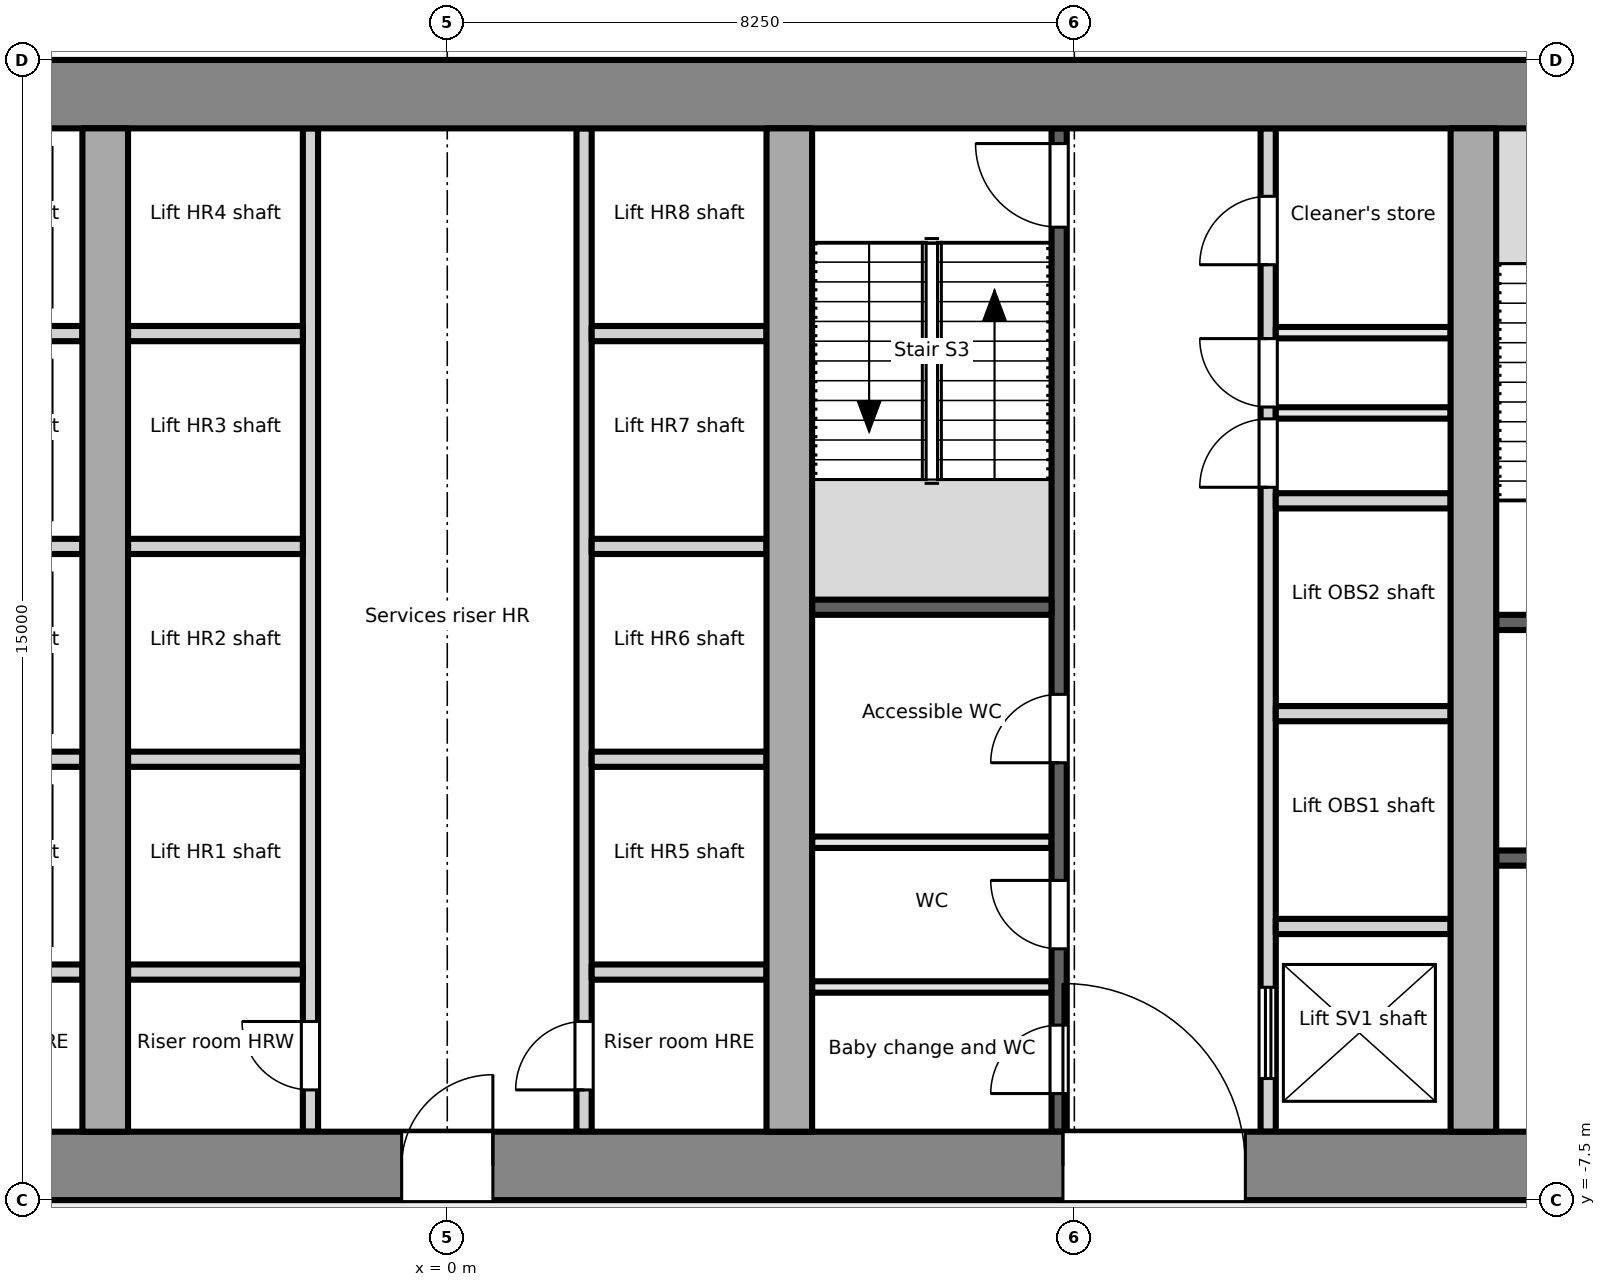
"""IFC4 building model, lengths in metres.
Left out: names, types, materials, properties, quantities, classifications, styles, units other than length and angle.
Written with IfcOpenShell. Run it as: python <this file> out.ifc"""

import sys

from ifc_helpers import new_model, si_unit, direction, frame, frame_2d, origin, place, context, subcontext, project, spatial, rectangle, extrude, element, fill, save


model = new_model("IFC4")
c1 = context("Model", 3, precision=1e-05, world=origin(), true_north=direction((0.0, 1.0)))
c2 = subcontext(c1, "Body", "Model", "MODEL_VIEW")
j1 = project(units=[si_unit("LENGTHUNIT", "METRE"), si_unit("PLANEANGLEUNIT", "RADIAN")], contexts=[c1])
p1 = place(None, origin())
s1 = spatial("IfcSite", under=j1, at=p1, CompositionType="ELEMENT")
p2 = place(p1, origin())
s2 = spatial("IfcBuilding", under=s1, at=p2, CompositionType="ELEMENT")
p3 = place(p2, frame((0.0, 0.0, 17.4)))
s3 = spatial("IfcBuildingStorey", under=s2, at=p3, CompositionType="ELEMENT", Elevation=17.4)
p4 = place(p3, frame((-18.0, -7.05, -0.2), z_axis=(0.0, 0.0, 1.0), x_axis=(1.0, 0.0, 0.0)))
e1 = element("IfcWall", 1, at=p4, inside=s3, PredefinedType="SHEAR", context=c2, shape_type="SweptSolid", body=[
    extrude(rectangle(XDim=36.0, YDim=0.9, at=frame_2d((18.0, 0.0))), origin(), (0.0, 0.0, 1.0), 4.8),
])
p5 = place(p4, frame((7.8, 0.0, 0.2)))
e2 = element("IfcOpeningElement", 2, at=p5, cuts=e1, PredefinedType="OPENING", context=c2, shape_type="SweptSolid", body=[
    extrude(rectangle(XDim=2.4, YDim=2.1, at=frame_2d((1.2, 1.05))), frame((0.0, 0.46, 0.0), z_axis=(0.0, -1.0, 0.0), x_axis=(1.0, 0.0, 0.0)), (0.0, 0.0, 1.0), 0.921),
])
p6 = place(p4, frame((17.4, 0.0, 0.2)))
e3 = element("IfcOpeningElement", 3, at=p6, cuts=e1, PredefinedType="OPENING", context=c2, shape_type="SweptSolid", body=[
    extrude(rectangle(XDim=1.2, YDim=2.1, at=frame_2d((0.6, 1.05))), frame((0.0, 0.46, 0.0), z_axis=(0.0, -1.0, 0.0), x_axis=(1.0, 0.0, 0.0)), (0.0, 0.0, 1.0), 0.921),
])
p7 = place(p4, frame((26.1, 0.0, 0.2)))
e4 = element("IfcOpeningElement", 4, at=p7, cuts=e1, PredefinedType="OPENING", context=c2, shape_type="SweptSolid", body=[
    extrude(rectangle(XDim=2.4, YDim=2.1, at=frame_2d((1.2, 1.05))), frame((0.0, 0.46, 0.0), z_axis=(0.0, -1.0, 0.0), x_axis=(1.0, 0.0, 0.0)), (0.0, 0.0, 1.0), 0.921),
])
p8 = place(p3, frame((-18.0, 7.05, -0.2), z_axis=(0.0, 0.0, 1.0), x_axis=(1.0, 0.0, 0.0)))
e5 = element("IfcWall", 5, at=p8, inside=s3, PredefinedType="SHEAR", context=c2, shape_type="SweptSolid", body=[
    extrude(rectangle(XDim=36.0, YDim=0.9, at=frame_2d((18.0, 0.0))), origin(), (0.0, 0.0, 1.0), 4.8),
])
for number, where, z_axis, x_axis in (
    (6, (-4.5, -6.6, -0.2), (0.0, 0.0, 1.0), (0.0, 1.0, 0.0)),
    (7, (4.5, -6.6, -0.2), (0.0, 0.0, 1.0), (0.0, 1.0, 0.0)),
    (8, (13.5, -6.6, -0.2), (0.0, 0.0, 1.0), (0.0, 1.0, 0.0)),
):
    element("IfcWall", number, at=place(p3, frame(where, z_axis=z_axis, x_axis=x_axis)), inside=s3, PredefinedType="SHEAR", context=c2, shape_type="SweptSolid", body=[
        extrude(rectangle(XDim=13.2, YDim=0.6, at=frame_2d((6.6, 0.0))), origin(), (0.0, 0.0, 1.0), 4.8),
    ])
p9 = place(p3, frame((13.8, -3.0, 0.0), z_axis=(0.0, 0.0, 1.0), x_axis=(1.0, 0.0, 0.0)))
e9 = element("IfcWall", 9, at=p9, inside=s3, PredefinedType="PARTITIONING", context=c2, shape_type="SweptSolid", body=[
    extrude(rectangle(XDim=3.3, YDim=0.2, at=frame_2d((1.65, 0.0))), origin(), (0.0, 0.0, 1.0), 4.6),
])
p10 = place(p9, frame((1.1, 0.0, 0.0)))
e10 = element("IfcOpeningElement", 10, at=p10, cuts=e9, PredefinedType="OPENING", context=c2, shape_type="SweptSolid", body=[
    extrude(rectangle(XDim=1.1, YDim=2.1, at=frame_2d((0.55, 1.05))), frame((0.0, 0.111, 0.0), z_axis=(0.0, -1.0, 0.0), x_axis=(1.0, 0.0, 0.0)), (0.0, 0.0, 1.0), 0.221),
])
p11 = place(p3, frame((13.8, 0.1, 0.0), z_axis=(0.0, 0.0, 1.0), x_axis=(1.0, 0.0, 0.0)))
e11 = element("IfcWall", 11, at=p11, inside=s3, PredefinedType="PARTITIONING", context=c2, shape_type="SweptSolid", body=[
    extrude(rectangle(XDim=3.3, YDim=0.2, at=frame_2d((1.65, 0.0))), origin(), (0.0, 0.0, 1.0), 4.6),
])
p12 = place(p11, frame((1.1, 0.0, 0.0)))
e12 = element("IfcOpeningElement", 12, at=p12, cuts=e11, PredefinedType="OPENING", context=c2, shape_type="SweptSolid", body=[
    extrude(rectangle(XDim=1.1, YDim=2.1, at=frame_2d((0.55, 1.05))), frame((0.0, 0.111, 0.0), z_axis=(0.0, -1.0, 0.0), x_axis=(1.0, 0.0, 0.0)), (0.0, 0.0, 1.0), 0.221),
])
for number, where, z_axis, x_axis in (
    (13, (-7.1, -1.7, 0.0), (0.0, 0.0, 1.0), (1.0, 0.0, 0.0)),
    (14, (-7.1, 1.1, 0.0), (0.0, 0.0, 1.0), (1.0, 0.0, 0.0)),
    (15, (-7.1, 3.9, 0.0), (0.0, 0.0, 1.0), (1.0, 0.0, 0.0)),
    (16, (-7.1, -4.5, 0.0), (0.0, 0.0, 1.0), (1.0, 0.0, 0.0)),
):
    element("IfcWall", number, at=place(p3, frame(where, z_axis=z_axis, x_axis=x_axis)), inside=s3, PredefinedType="PARTITIONING", context=c2, shape_type="SweptSolid", body=[
        extrude(rectangle(XDim=2.3, YDim=0.2, at=frame_2d((1.15, 0.0))), origin(), (0.0, 0.0, 1.0), 4.6),
    ])
p13 = place(p3, frame((-1.8, -6.6, 0.0), z_axis=(0.0, 0.0, 1.0), x_axis=(0.0, 1.0, 0.0)))
e17 = element("IfcWall", 17, at=p13, inside=s3, PredefinedType="PARTITIONING", context=c2, shape_type="SweptSolid", body=[
    extrude(rectangle(XDim=13.2, YDim=0.2, at=frame_2d((6.6, 0.0))), origin(), (0.0, 0.0, 1.0), 4.6),
])
p14 = place(p13, frame((0.55, 0.0, 0.0)))
e18 = element("IfcOpeningElement", 18, at=p14, cuts=e17, PredefinedType="OPENING", context=c2, shape_type="SweptSolid", body=[
    extrude(rectangle(XDim=0.9, YDim=2.1, at=frame_2d((0.45, 1.05))), frame((0.0, 0.111, 0.0), z_axis=(0.0, -1.0, 0.0), x_axis=(1.0, 0.0, 0.0)), (0.0, 0.0, 1.0), 0.221),
])
p15 = place(p3, frame((1.8, -6.6, 0.0), z_axis=(0.0, 0.0, 1.0), x_axis=(0.0, 1.0, 0.0)))
e19 = element("IfcWall", 19, at=p15, inside=s3, PredefinedType="PARTITIONING", context=c2, shape_type="SweptSolid", body=[
    extrude(rectangle(XDim=13.2, YDim=0.2, at=frame_2d((6.6, 0.0))), origin(), (0.0, 0.0, 1.0), 4.6),
])
p16 = place(p15, frame((0.55, 0.0, 0.0)))
e20 = element("IfcOpeningElement", 20, at=p16, cuts=e19, PredefinedType="OPENING", context=c2, shape_type="SweptSolid", body=[
    extrude(rectangle(XDim=0.9, YDim=2.1, at=frame_2d((0.45, 1.05))), frame((0.0, 0.111, 0.0), z_axis=(0.0, -1.0, 0.0), x_axis=(1.0, 0.0, 0.0)), (0.0, 0.0, 1.0), 0.221),
])
for number, where, z_axis, x_axis in (
    (21, (-4.2, -1.7, 0.0), (0.0, 0.0, 1.0), (1.0, 0.0, 0.0)),
    (22, (-4.2, 1.1, 0.0), (0.0, 0.0, 1.0), (1.0, 0.0, 0.0)),
    (23, (-4.2, 3.9, 0.0), (0.0, 0.0, 1.0), (1.0, 0.0, 0.0)),
    (24, (-4.2, -4.5, 0.0), (0.0, 0.0, 1.0), (1.0, 0.0, 0.0)),
    (25, (1.9, -1.7, 0.0), (0.0, 0.0, 1.0), (1.0, 0.0, 0.0)),
    (26, (1.9, 1.1, 0.0), (0.0, 0.0, 1.0), (1.0, 0.0, 0.0)),
    (27, (1.9, 3.9, 0.0), (0.0, 0.0, 1.0), (1.0, 0.0, 0.0)),
    (28, (1.9, -4.5, 0.0), (0.0, 0.0, 1.0), (1.0, 0.0, 0.0)),
):
    element("IfcWall", number, at=place(p3, frame(where, z_axis=z_axis, x_axis=x_axis)), inside=s3, PredefinedType="PARTITIONING", context=c2, shape_type="SweptSolid", body=[
        extrude(rectangle(XDim=2.3, YDim=0.2, at=frame_2d((1.15, 0.0))), origin(), (0.0, 0.0, 1.0), 4.6),
    ])
p17 = place(p3, frame((8.05, -6.6, 0.0), z_axis=(0.0, 0.0, 1.0), x_axis=(0.0, 1.0, 0.0)))
e29 = element("IfcWall", 29, at=p17, inside=s3, PredefinedType="PARTITIONING", context=c2, shape_type="SweptSolid", body=[
    extrude(rectangle(XDim=13.2, YDim=0.2, at=frame_2d((6.6, 0.0))), origin(), (0.0, 0.0, 1.0), 4.6),
])
p18 = place(p17, frame((0.502, 0.0, 0.0)))
e30 = element("IfcOpeningElement", 30, at=p18, cuts=e29, PredefinedType="OPENING", context=c2, shape_type="SweptSolid", body=[
    extrude(rectangle(XDim=0.9, YDim=2.1, at=frame_2d((0.45, 1.05))), frame((0.0, 0.111, 0.0), z_axis=(0.0, -1.0, 0.0), x_axis=(1.0, 0.0, 0.0)), (0.0, 0.0, 1.0), 0.221),
])
p19 = place(p17, frame((2.406, 0.0, 0.0)))
e31 = element("IfcOpeningElement", 31, at=p19, cuts=e29, PredefinedType="OPENING", context=c2, shape_type="SweptSolid", body=[
    extrude(rectangle(XDim=0.9, YDim=2.1, at=frame_2d((0.45, 1.05))), frame((0.0, 0.111, 0.0), z_axis=(0.0, -1.0, 0.0), x_axis=(1.0, 0.0, 0.0)), (0.0, 0.0, 1.0), 0.221),
])
p20 = place(p17, frame((4.854, 0.0, 0.0)))
e32 = element("IfcOpeningElement", 32, at=p20, cuts=e29, PredefinedType="OPENING", context=c2, shape_type="SweptSolid", body=[
    extrude(rectangle(XDim=0.9, YDim=2.1, at=frame_2d((0.45, 1.05))), frame((0.0, 0.111, 0.0), z_axis=(0.0, -1.0, 0.0), x_axis=(1.0, 0.0, 0.0)), (0.0, 0.0, 1.0), 0.221),
])
p21 = place(p17, frame((11.9, 0.0, 0.0)))
e33 = element("IfcOpeningElement", 33, at=p21, cuts=e29, PredefinedType="OPENING", context=c2, shape_type="SweptSolid", body=[
    extrude(rectangle(XDim=1.1, YDim=2.1, at=frame_2d((0.55, 1.05))), frame((0.0, 0.111, 0.0), z_axis=(0.0, -1.0, 0.0), x_axis=(1.0, 0.0, 0.0)), (0.0, 0.0, 1.0), 0.221),
])
p22 = place(p3, frame((10.8, -6.6, 0.0), z_axis=(0.0, 0.0, 1.0), x_axis=(0.0, 1.0, 0.0)))
e34 = element("IfcWall", 34, at=p22, inside=s3, PredefinedType="PARTITIONING", context=c2, shape_type="SweptSolid", body=[
    extrude(rectangle(XDim=13.2, YDim=0.2, at=frame_2d((6.6, 0.0))), origin(), (0.0, 0.0, 1.0), 4.6),
])
p23 = place(p22, frame((0.7, 0.0, 0.0)))
e35 = element("IfcOpeningElement", 35, at=p23, cuts=e34, PredefinedType="OPENING", context=c2, shape_type="SweptSolid", body=[
    extrude(rectangle(XDim=1.2, YDim=2.1, at=frame_2d((0.6, 1.05))), frame((0.0, 0.111, 0.0), z_axis=(0.0, -1.0, 0.0), x_axis=(1.0, 0.0, 0.0)), (0.0, 0.0, 1.0), 0.221),
])
p24 = place(p22, frame((8.478, 0.0, 0.0)))
e36 = element("IfcOpeningElement", 36, at=p24, cuts=e34, PredefinedType="OPENING", context=c2, shape_type="SweptSolid", body=[
    extrude(rectangle(XDim=0.9, YDim=2.1, at=frame_2d((0.45, 1.05))), frame((0.0, 0.111, 0.0), z_axis=(0.0, -1.0, 0.0), x_axis=(1.0, 0.0, 0.0)), (0.0, 0.0, 1.0), 0.221),
])
p25 = place(p22, frame((9.534, 0.0, 0.0)))
e37 = element("IfcOpeningElement", 37, at=p25, cuts=e34, PredefinedType="OPENING", context=c2, shape_type="SweptSolid", body=[
    extrude(rectangle(XDim=0.9, YDim=2.1, at=frame_2d((0.45, 1.05))), frame((0.0, 0.111, 0.0), z_axis=(0.0, -1.0, 0.0), x_axis=(1.0, 0.0, 0.0)), (0.0, 0.0, 1.0), 0.221),
])
p26 = place(p22, frame((11.406, 0.0, 0.0)))
e38 = element("IfcOpeningElement", 38, at=p26, cuts=e34, PredefinedType="OPENING", context=c2, shape_type="SweptSolid", body=[
    extrude(rectangle(XDim=0.9, YDim=2.1, at=frame_2d((0.45, 1.05))), frame((0.0, 0.111, 0.0), z_axis=(0.0, -1.0, 0.0), x_axis=(1.0, 0.0, 0.0)), (0.0, 0.0, 1.0), 0.221),
])
p27 = place(p3, frame((4.8, 0.3, 0.0), z_axis=(0.0, 0.0, 1.0), x_axis=(1.0, 0.0, 0.0)))
e39 = element("IfcWall", 39, at=p27, inside=s3, PredefinedType="PARTITIONING", context=c2, shape_type="SweptSolid", body=[
    extrude(rectangle(XDim=3.15, YDim=0.2, at=frame_2d((1.575, 0.0))), origin(), (0.0, 0.0, 1.0), 4.6),
])
for number, where, z_axis, x_axis in (
    (40, (4.8, -4.696, 0.0), (0.0, 0.0, 1.0), (1.0, 0.0, 0.0)),
    (41, (4.8, -2.792, 0.0), (0.0, 0.0, 1.0), (1.0, 0.0, 0.0)),
):
    element("IfcWall", number, at=place(p3, frame(where, z_axis=z_axis, x_axis=x_axis)), inside=s3, PredefinedType="PARTITIONING", context=c2, shape_type="SweptSolid", body=[
        extrude(rectangle(XDim=3.15, YDim=0.15, at=frame_2d((1.575, 0.0))), origin(), (0.0, 0.0, 1.0), 4.6),
    ])
for number, where, z_axis, x_axis in (
    (42, (10.9, -3.9, 0.0), (0.0, 0.0, 1.0), (1.0, 0.0, 0.0)),
    (43, (10.9, -1.1, 0.0), (0.0, 0.0, 1.0), (1.0, 0.0, 0.0)),
    (44, (10.9, 1.7, 0.0), (0.0, 0.0, 1.0), (1.0, 0.0, 0.0)),
):
    element("IfcWall", number, at=place(p3, frame(where, z_axis=z_axis, x_axis=x_axis)), inside=s3, PredefinedType="PARTITIONING", context=c2, shape_type="SweptSolid", body=[
        extrude(rectangle(XDim=2.3, YDim=0.2, at=frame_2d((1.15, 0.0))), origin(), (0.0, 0.0, 1.0), 4.6),
    ])
for number, where, z_axis, x_axis in (
    (45, (10.9, 2.856, 0.0), (0.0, 0.0, 1.0), (1.0, 0.0, 0.0)),
    (46, (10.9, 3.912, 0.0), (0.0, 0.0, 1.0), (1.0, 0.0, 0.0)),
):
    element("IfcWall", number, at=place(p3, frame(where, z_axis=z_axis, x_axis=x_axis)), inside=s3, PredefinedType="PARTITIONING", context=c2, shape_type="SweptSolid", body=[
        extrude(rectangle(XDim=2.3, YDim=0.15, at=frame_2d((1.15, 0.0))), origin(), (0.0, 0.0, 1.0), 4.6),
    ])
p28 = place(p14, origin())
e47 = element("IfcDoor", 47, at=p28, inside=s3, OperationType="SINGLE_SWING_RIGHT", PredefinedType="DOOR", context=c2, shape_type="SweptSolid", body=[
    extrude(rectangle(XDim=0.9, YDim=2.1, at=frame_2d((0.45, 1.05))), frame((0.0, 0.025, 0.0), z_axis=(0.0, -1.0, 0.0), x_axis=(1.0, 0.0, 0.0)), (0.0, 0.0, 1.0), 0.05),
])
fill(e18, e47)
p29 = place(p16, origin())
e48 = element("IfcDoor", 48, at=p29, inside=s3, OperationType="SINGLE_SWING_LEFT", PredefinedType="DOOR", context=c2, shape_type="SweptSolid", body=[
    extrude(rectangle(XDim=0.9, YDim=2.1, at=frame_2d((0.45, 1.05))), frame((0.0, 0.025, 0.0), z_axis=(0.0, -1.0, 0.0), x_axis=(1.0, 0.0, 0.0)), (0.0, 0.0, 1.0), 0.05),
])
fill(e20, e48)
p30 = place(p6, origin())
e49 = element("IfcDoor", 49, at=p30, inside=s3, OperationType="SINGLE_SWING_RIGHT", PredefinedType="DOOR", context=c2, shape_type="SweptSolid", body=[
    extrude(rectangle(XDim=1.2, YDim=2.1, at=frame_2d((0.6, 1.05))), frame((0.0, 0.025, 0.0), z_axis=(0.0, -1.0, 0.0), x_axis=(1.0, 0.0, 0.0)), (0.0, 0.0, 1.0), 0.05),
])
fill(e3, e49)
p31 = place(p18, origin())
e50 = element("IfcDoor", 50, at=p31, inside=s3, OperationType="SINGLE_SWING_LEFT", PredefinedType="DOOR", context=c2, shape_type="SweptSolid", body=[
    extrude(rectangle(XDim=0.9, YDim=2.1, at=frame_2d((0.45, 1.05))), frame((0.0, 0.025, 0.0), z_axis=(0.0, -1.0, 0.0), x_axis=(1.0, 0.0, 0.0)), (0.0, 0.0, 1.0), 0.05),
])
fill(e30, e50)
p32 = place(p19, origin())
e51 = element("IfcDoor", 51, at=p32, inside=s3, OperationType="SINGLE_SWING_RIGHT", PredefinedType="DOOR", context=c2, shape_type="SweptSolid", body=[
    extrude(rectangle(XDim=0.9, YDim=2.1, at=frame_2d((0.45, 1.05))), frame((0.0, 0.025, 0.0), z_axis=(0.0, -1.0, 0.0), x_axis=(1.0, 0.0, 0.0)), (0.0, 0.0, 1.0), 0.05),
])
fill(e31, e51)
p33 = place(p20, origin())
e52 = element("IfcDoor", 52, at=p33, inside=s3, OperationType="SINGLE_SWING_LEFT", PredefinedType="DOOR", context=c2, shape_type="SweptSolid", body=[
    extrude(rectangle(XDim=0.9, YDim=2.1, at=frame_2d((0.45, 1.05))), frame((0.0, 0.025, 0.0), z_axis=(0.0, -1.0, 0.0), x_axis=(1.0, 0.0, 0.0)), (0.0, 0.0, 1.0), 0.05),
])
fill(e32, e52)
p34 = place(p21, origin())
e53 = element("IfcDoor", 53, at=p34, inside=s3, OperationType="SINGLE_SWING_RIGHT", PredefinedType="DOOR", context=c2, shape_type="SweptSolid", body=[
    extrude(rectangle(XDim=1.1, YDim=2.1, at=frame_2d((0.55, 1.05))), frame((0.0, 0.025, 0.0), z_axis=(0.0, -1.0, 0.0), x_axis=(1.0, 0.0, 0.0)), (0.0, 0.0, 1.0), 0.05),
])
fill(e33, e53)
p35 = place(p7, origin())
e54 = element("IfcDoor", 54, at=p35, inside=s3, OperationType="DOUBLE_DOOR_DOUBLE_SWING", PredefinedType="DOOR", context=c2, shape_type="SweptSolid", body=[
    extrude(rectangle(XDim=2.4, YDim=2.1, at=frame_2d((1.2, 1.05))), frame((0.0, 0.025, 0.0), z_axis=(0.0, -1.0, 0.0), x_axis=(1.0, 0.0, 0.0)), (0.0, 0.0, 1.0), 0.05),
])
fill(e4, e54)
p36 = place(p23, origin())
e55 = element("IfcDoor", 55, at=p36, inside=s3, OperationType="DOUBLE_DOOR_SLIDING", PredefinedType="DOOR", context=c2, shape_type="SweptSolid", body=[
    extrude(rectangle(XDim=1.2, YDim=2.1, at=frame_2d((0.6, 1.05))), frame((0.0, 0.025, 0.0), z_axis=(0.0, -1.0, 0.0), x_axis=(1.0, 0.0, 0.0)), (0.0, 0.0, 1.0), 0.05),
])
fill(e35, e55)
p37 = place(p24, origin())
e56 = element("IfcDoor", 56, at=p37, inside=s3, OperationType="SINGLE_SWING_LEFT", PredefinedType="DOOR", context=c2, shape_type="SweptSolid", body=[
    extrude(rectangle(XDim=0.9, YDim=2.1, at=frame_2d((0.45, 1.05))), frame((0.0, 0.025, 0.0), z_axis=(0.0, -1.0, 0.0), x_axis=(1.0, 0.0, 0.0)), (0.0, 0.0, 1.0), 0.05),
])
fill(e36, e56)
p38 = place(p25, origin())
e57 = element("IfcDoor", 57, at=p38, inside=s3, OperationType="SINGLE_SWING_RIGHT", PredefinedType="DOOR", context=c2, shape_type="SweptSolid", body=[
    extrude(rectangle(XDim=0.9, YDim=2.1, at=frame_2d((0.45, 1.05))), frame((0.0, 0.025, 0.0), z_axis=(0.0, -1.0, 0.0), x_axis=(1.0, 0.0, 0.0)), (0.0, 0.0, 1.0), 0.05),
])
fill(e37, e57)
p39 = place(p26, origin())
e58 = element("IfcDoor", 58, at=p39, inside=s3, OperationType="SINGLE_SWING_LEFT", PredefinedType="DOOR", context=c2, shape_type="SweptSolid", body=[
    extrude(rectangle(XDim=0.9, YDim=2.1, at=frame_2d((0.45, 1.05))), frame((0.0, 0.025, 0.0), z_axis=(0.0, -1.0, 0.0), x_axis=(1.0, 0.0, 0.0)), (0.0, 0.0, 1.0), 0.05),
])
fill(e38, e58)
save(model, sys.argv[1])
